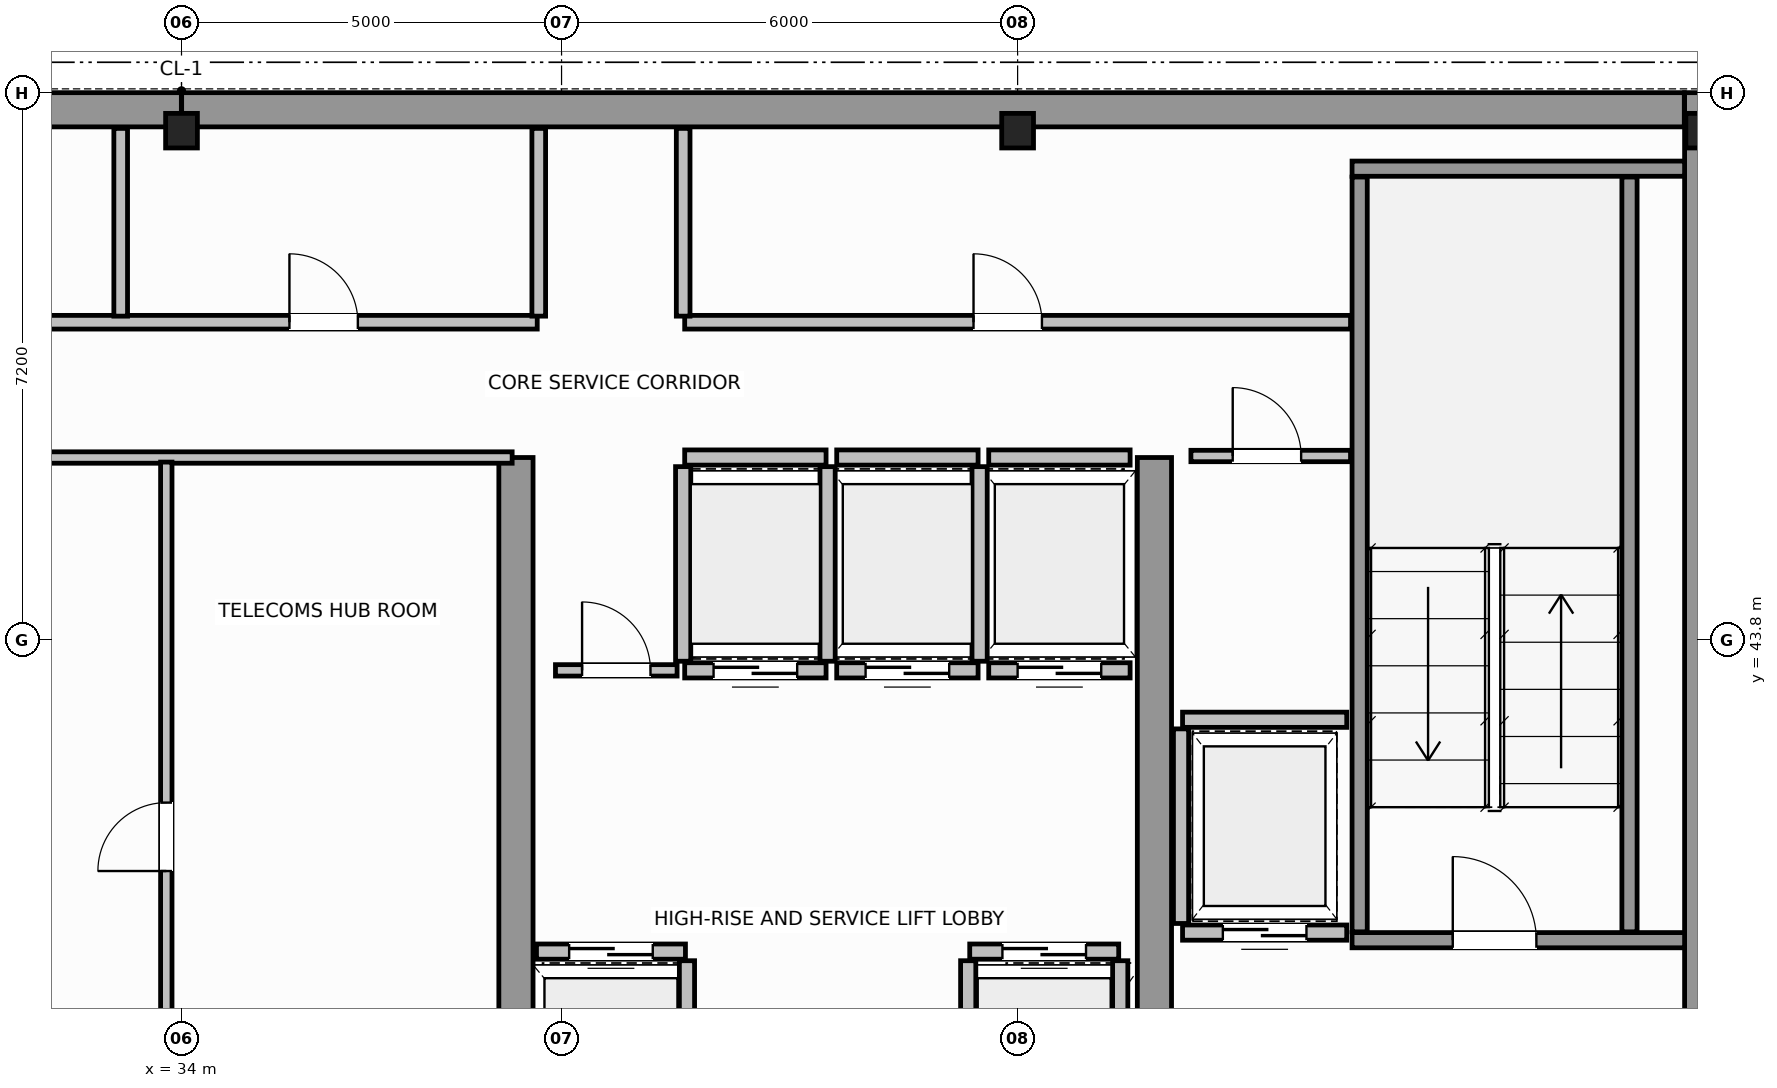
"""IFC4 building model, lengths in metres.
Left out: names, types, materials, properties, quantities, classifications, styles, units other than length and angle.
Written with IfcOpenShell. Run it as: python <this file> out.ifc"""

import sys

from ifc_helpers import new_model, si_unit, direction, frame, frame_2d, origin, origin_2d, place, context, subcontext, project, spatial, rectangle, i_section, extrude, source, transform, mapped, element, fill, save


model = new_model("IFC4")
c1 = context("Model", 3, precision=1e-05, world=origin(), true_north=direction((0.0, 1.0)))
c2 = subcontext(c1, "Body", "Model", "MODEL_VIEW")
j1 = project(units=[si_unit("LENGTHUNIT", "METRE"), si_unit("PLANEANGLEUNIT", "RADIAN")], contexts=[c1])
p1 = place(None, origin())
s1 = spatial("IfcSite", under=j1, at=p1, CompositionType="ELEMENT")
p2 = place(p1, origin())
s2 = spatial("IfcBuilding", under=s1, at=p2, CompositionType="ELEMENT")
p3 = place(p2, frame((0.0, 0.0, 257.4)))
s3 = spatial("IfcBuildingStorey", under=s2, at=p3, CompositionType="ELEMENT", Elevation=257.4)
m1 = source(origin(), c2, "Body", "SweptSolid", [
    extrude(i_section(OverallWidth=0.418, OverallDepth=0.455, WebThickness=0.042, FlangeThickness=0.058, FilletRadius=0.015, at=origin_2d()), origin(), (0.0, 0.0, 1.0), 3.8),
])
for number, where, z_axis, x_axis in (
    (1, (34.0, 50.5, 0.0), (0.0, 0.0, 1.0), (1.0, 0.0, 0.0)),
    (2, (45.0, 50.5, 0.0), (0.0, 0.0, 1.0), (1.0, 0.0, 0.0)),
    (3, (54.0, 50.5, 0.0), (0.0, 0.0, 1.0), (1.0, 0.0, 0.0)),
):
    element("IfcColumn", number, at=place(p3, frame(where, z_axis=z_axis, x_axis=x_axis)), inside=s3, PredefinedType="COLUMN", context=c2, shape_type="MappedRepresentation", body=[
        mapped(m1, transform((0.0, 0.0, 0.0), scale=1.0)),
    ])
for number, where, z_axis, x_axis in (
    (4, (14.229, 50.775, 0.0), (0.0, 0.0, 1.0), (1.0, 0.0, 0.0)),
    (5, (34.002, 50.775, 0.0), (0.0, 0.0, 1.0), (1.0, 0.0, 0.0)),
):
    element("IfcWall", number, at=place(p3, frame(where, z_axis=z_axis, x_axis=x_axis)), inside=s3, PredefinedType="SHEAR", context=c2, shape_type="SweptSolid", body=[
        extrude(rectangle(XDim=19.769, YDim=0.45, at=frame_2d((9.885, 0.0))), origin(), (0.0, 0.0, 1.0), 3.8),
    ])
p4 = place(p3, frame((54.0, 36.5, 0.0), z_axis=(0.0, 0.0, 1.0), x_axis=(0.0, 1.0, 0.0)))
e6 = element("IfcWall", 6, at=p4, inside=s3, PredefinedType="SHEAR", context=c2, shape_type="SweptSolid", body=[
    extrude(rectangle(XDim=14.5, YDim=0.45, at=frame_2d((7.25, 0.0))), origin(), (0.0, 0.0, 1.0), 3.8),
])
for number, where, z_axis, x_axis in (
    (7, (38.4, 36.745, 0.0), (0.0, 0.0, 1.0), (0.0, 1.0, 0.0)),
    (8, (46.8, 36.745, 0.0), (0.0, 0.0, 1.0), (0.0, 1.0, 0.0)),
):
    element("IfcWall", number, at=place(p3, frame(where, z_axis=z_axis, x_axis=x_axis)), inside=s3, PredefinedType="SHEAR", context=c2, shape_type="SweptSolid", body=[
        extrude(rectangle(XDim=9.455, YDim=0.45, at=frame_2d((4.728, 0.0))), origin(), (0.0, 0.0, 1.0), 3.8),
    ])
p5 = place(p3, frame((49.4, 39.85, 0.0), z_axis=(0.0, 0.0, 1.0), x_axis=(1.0, 0.0, 0.0)))
e9 = element("IfcWall", 9, at=p5, inside=s3, PredefinedType="SOLIDWALL", context=c2, shape_type="SweptSolid", body=[
    extrude(rectangle(XDim=4.375, YDim=0.2, at=frame_2d((2.188, 0.0))), origin(), (0.0, 0.0, 1.0), 3.8),
])
p6 = place(p5, frame((1.325, 0.0, 0.0)))
e10 = element("IfcOpeningElement", 10, at=p6, cuts=e9, PredefinedType="OPENING", context=c2, shape_type="SweptSolid", body=[
    extrude(rectangle(XDim=1.1, YDim=2.15, at=frame_2d((0.55, 1.075))), frame((0.0, 0.11, 0.0), z_axis=(0.0, -1.0, 0.0), x_axis=(1.0, 0.0, 0.0)), (0.0, 0.0, 1.0), 0.22),
])
p7 = place(p3, frame((49.4, 50.0, 0.0), z_axis=(0.0, 0.0, 1.0), x_axis=(1.0, 0.0, 0.0)))
e11 = element("IfcWall", 11, at=p7, inside=s3, PredefinedType="SOLIDWALL", context=c2, shape_type="SweptSolid", body=[
    extrude(rectangle(XDim=4.375, YDim=0.2, at=frame_2d((2.188, 0.0))), origin(), (0.0, 0.0, 1.0), 3.8),
])
for number, where, z_axis, x_axis in (
    (12, (49.5, 39.96, 0.0), (0.0, 0.0, 1.0), (0.0, 1.0, 0.0)),
    (13, (53.05, 39.96, 0.0), (0.0, 0.0, 1.0), (0.0, 1.0, 0.0)),
):
    element("IfcWall", number, at=place(p3, frame(where, z_axis=z_axis, x_axis=x_axis)), inside=s3, PredefinedType="SOLIDWALL", context=c2, shape_type="SweptSolid", body=[
        extrude(rectangle(XDim=9.93, YDim=0.2, at=frame_2d((4.965, 0.0))), origin(), (0.0, 0.0, 1.0), 3.8),
    ])
p8 = place(p3, frame((38.67, 39.7, 0.0), z_axis=(0.0, 0.0, 1.0), x_axis=(1.0, 0.0, 0.0)))
e14 = element("IfcWall", 14, at=p8, inside=s3, PredefinedType="SOLIDWALL", context=c2, shape_type="SweptSolid", body=[
    extrude(rectangle(XDim=1.96, YDim=0.2, at=frame_2d((0.98, 0.0))), origin(), (0.0, 0.0, 1.0), 3.58),
])
p9 = place(p8, frame((0.43, 0.0, 0.0)))
e15 = element("IfcOpeningElement", 15, at=p9, cuts=e14, PredefinedType="OPENING", context=c2, shape_type="SweptSolid", body=[
    extrude(rectangle(XDim=1.1, YDim=2.15, at=frame_2d((0.55, 1.075))), frame((0.0, 0.11, 0.0), z_axis=(0.0, -1.0, 0.0), x_axis=(1.0, 0.0, 0.0)), (0.0, 0.0, 1.0), 0.22),
])
p10 = place(p3, frame((40.65, 37.02, 0.0), z_axis=(0.0, 0.0, 1.0), x_axis=(0.0, 1.0, 0.0)))
e16 = element("IfcWall", 16, at=p10, inside=s3, PredefinedType="SOLIDWALL", context=c2, shape_type="SweptSolid", body=[
    extrude(rectangle(XDim=2.56, YDim=0.2, at=frame_2d((1.28, 0.0))), origin(), (0.0, 0.0, 1.0), 3.58),
])
p11 = place(p3, frame((44.37, 39.7, 0.0), z_axis=(0.0, 0.0, 1.0), x_axis=(1.0, 0.0, 0.0)))
e17 = element("IfcWall", 17, at=p11, inside=s3, PredefinedType="SOLIDWALL", context=c2, shape_type="SweptSolid", body=[
    extrude(rectangle(XDim=1.96, YDim=0.2, at=frame_2d((0.98, 0.0))), origin(), (0.0, 0.0, 1.0), 3.58),
])
p12 = place(p11, frame((0.43, 0.0, 0.0)))
e18 = element("IfcOpeningElement", 18, at=p12, cuts=e17, PredefinedType="OPENING", context=c2, shape_type="SweptSolid", body=[
    extrude(rectangle(XDim=1.1, YDim=2.15, at=frame_2d((0.55, 1.075))), frame((0.0, 0.11, 0.0), z_axis=(0.0, -1.0, 0.0), x_axis=(1.0, 0.0, 0.0)), (0.0, 0.0, 1.0), 0.22),
])
for number, where, z_axis, x_axis in (
    (19, (44.35, 37.02, 0.0), (0.0, 0.0, 1.0), (0.0, 1.0, 0.0)),
    (20, (46.35, 37.02, 0.0), (0.0, 0.0, 1.0), (0.0, 1.0, 0.0)),
):
    element("IfcWall", number, at=place(p3, frame(where, z_axis=z_axis, x_axis=x_axis)), inside=s3, PredefinedType="SOLIDWALL", context=c2, shape_type="SweptSolid", body=[
        extrude(rectangle(XDim=2.56, YDim=0.2, at=frame_2d((1.28, 0.0))), origin(), (0.0, 0.0, 1.0), 3.58),
    ])
p13 = place(p3, frame((40.62, 43.4, 0.0), z_axis=(0.0, 0.0, 1.0), x_axis=(1.0, 0.0, 0.0)))
e21 = element("IfcWall", 21, at=p13, inside=s3, PredefinedType="SOLIDWALL", context=c2, shape_type="SweptSolid", body=[
    extrude(rectangle(XDim=1.86, YDim=0.2, at=frame_2d((0.93, 0.0))), origin(), (0.0, 0.0, 1.0), 3.58),
])
p14 = place(p13, frame((0.38, 0.0, 0.0)))
e22 = element("IfcOpeningElement", 22, at=p14, cuts=e21, PredefinedType="OPENING", context=c2, shape_type="SweptSolid", body=[
    extrude(rectangle(XDim=1.1, YDim=2.15, at=frame_2d((0.55, 1.075))), frame((0.0, 0.11, 0.0), z_axis=(0.0, -1.0, 0.0), x_axis=(1.0, 0.0, 0.0)), (0.0, 0.0, 1.0), 0.22),
])
p15 = place(p3, frame((40.62, 46.2, 0.0), z_axis=(0.0, 0.0, 1.0), x_axis=(1.0, 0.0, 0.0)))
e23 = element("IfcWall", 23, at=p15, inside=s3, PredefinedType="SOLIDWALL", context=c2, shape_type="SweptSolid", body=[
    extrude(rectangle(XDim=1.86, YDim=0.2, at=frame_2d((0.93, 0.0))), origin(), (0.0, 0.0, 1.0), 3.58),
])
for number, where, z_axis, x_axis in (
    (24, (40.6, 43.52, 0.0), (0.0, 0.0, 1.0), (0.0, 1.0, 0.0)),
    (25, (42.5, 43.52, 0.0), (0.0, 0.0, 1.0), (0.0, 1.0, 0.0)),
):
    element("IfcWall", number, at=place(p3, frame(where, z_axis=z_axis, x_axis=x_axis)), inside=s3, PredefinedType="SOLIDWALL", context=c2, shape_type="SweptSolid", body=[
        extrude(rectangle(XDim=2.56, YDim=0.2, at=frame_2d((1.28, 0.0))), origin(), (0.0, 0.0, 1.0), 3.58),
    ])
p16 = place(p3, frame((42.62, 43.4, 0.0), z_axis=(0.0, 0.0, 1.0), x_axis=(1.0, 0.0, 0.0)))
e26 = element("IfcWall", 26, at=p16, inside=s3, PredefinedType="SOLIDWALL", context=c2, shape_type="SweptSolid", body=[
    extrude(rectangle(XDim=1.86, YDim=0.2, at=frame_2d((0.93, 0.0))), origin(), (0.0, 0.0, 1.0), 3.58),
])
p17 = place(p16, frame((0.38, 0.0, 0.0)))
e27 = element("IfcOpeningElement", 27, at=p17, cuts=e26, PredefinedType="OPENING", context=c2, shape_type="SweptSolid", body=[
    extrude(rectangle(XDim=1.1, YDim=2.15, at=frame_2d((0.55, 1.075))), frame((0.0, 0.11, 0.0), z_axis=(0.0, -1.0, 0.0), x_axis=(1.0, 0.0, 0.0)), (0.0, 0.0, 1.0), 0.22),
])
p18 = place(p3, frame((42.62, 46.2, 0.0), z_axis=(0.0, 0.0, 1.0), x_axis=(1.0, 0.0, 0.0)))
e28 = element("IfcWall", 28, at=p18, inside=s3, PredefinedType="SOLIDWALL", context=c2, shape_type="SweptSolid", body=[
    extrude(rectangle(XDim=1.86, YDim=0.2, at=frame_2d((0.93, 0.0))), origin(), (0.0, 0.0, 1.0), 3.58),
])
p19 = place(p3, frame((44.5, 43.52, 0.0), z_axis=(0.0, 0.0, 1.0), x_axis=(0.0, 1.0, 0.0)))
e29 = element("IfcWall", 29, at=p19, inside=s3, PredefinedType="SOLIDWALL", context=c2, shape_type="SweptSolid", body=[
    extrude(rectangle(XDim=2.56, YDim=0.2, at=frame_2d((1.28, 0.0))), origin(), (0.0, 0.0, 1.0), 3.58),
])
p20 = place(p3, frame((44.62, 43.4, 0.0), z_axis=(0.0, 0.0, 1.0), x_axis=(1.0, 0.0, 0.0)))
e30 = element("IfcWall", 30, at=p20, inside=s3, PredefinedType="SOLIDWALL", context=c2, shape_type="SweptSolid", body=[
    extrude(rectangle(XDim=1.86, YDim=0.2, at=frame_2d((0.93, 0.0))), origin(), (0.0, 0.0, 1.0), 3.58),
])
p21 = place(p20, frame((0.38, 0.0, 0.0)))
e31 = element("IfcOpeningElement", 31, at=p21, cuts=e30, PredefinedType="OPENING", context=c2, shape_type="SweptSolid", body=[
    extrude(rectangle(XDim=1.1, YDim=2.15, at=frame_2d((0.55, 1.075))), frame((0.0, 0.11, 0.0), z_axis=(0.0, -1.0, 0.0), x_axis=(1.0, 0.0, 0.0)), (0.0, 0.0, 1.0), 0.22),
])
p22 = place(p3, frame((44.62, 46.2, 0.0), z_axis=(0.0, 0.0, 1.0), x_axis=(1.0, 0.0, 0.0)))
e32 = element("IfcWall", 32, at=p22, inside=s3, PredefinedType="SOLIDWALL", context=c2, shape_type="SweptSolid", body=[
    extrude(rectangle(XDim=1.86, YDim=0.2, at=frame_2d((0.93, 0.0))), origin(), (0.0, 0.0, 1.0), 3.58),
])
p23 = place(p3, frame((47.17, 39.95, 0.0), z_axis=(0.0, 0.0, 1.0), x_axis=(1.0, 0.0, 0.0)))
e33 = element("IfcWall", 33, at=p23, inside=s3, PredefinedType="SOLIDWALL", context=c2, shape_type="SweptSolid", body=[
    extrude(rectangle(XDim=2.16, YDim=0.2, at=frame_2d((1.08, 0.0))), origin(), (0.0, 0.0, 1.0), 3.58),
])
p24 = place(p23, frame((0.53, 0.0, 0.0)))
e34 = element("IfcOpeningElement", 34, at=p24, cuts=e33, PredefinedType="OPENING", context=c2, shape_type="SweptSolid", body=[
    extrude(rectangle(XDim=1.1, YDim=2.15, at=frame_2d((0.55, 1.075))), frame((0.0, 0.11, 0.0), z_axis=(0.0, -1.0, 0.0), x_axis=(1.0, 0.0, 0.0)), (0.0, 0.0, 1.0), 0.22),
])
p25 = place(p3, frame((47.17, 42.75, 0.0), z_axis=(0.0, 0.0, 1.0), x_axis=(1.0, 0.0, 0.0)))
e35 = element("IfcWall", 35, at=p25, inside=s3, PredefinedType="SOLIDWALL", context=c2, shape_type="SweptSolid", body=[
    extrude(rectangle(XDim=2.16, YDim=0.2, at=frame_2d((1.08, 0.0))), origin(), (0.0, 0.0, 1.0), 3.58),
])
p26 = place(p3, frame((47.15, 40.07, 0.0), z_axis=(0.0, 0.0, 1.0), x_axis=(0.0, 1.0, 0.0)))
e36 = element("IfcWall", 36, at=p26, inside=s3, PredefinedType="SOLIDWALL", context=c2, shape_type="SweptSolid", body=[
    extrude(rectangle(XDim=2.56, YDim=0.2, at=frame_2d((1.28, 0.0))), origin(), (0.0, 0.0, 1.0), 3.58),
])
p27 = place(p3, frame((29.85, 46.2, 0.0), z_axis=(0.0, 0.0, 1.0), x_axis=(1.0, 0.0, 0.0)))
e37 = element("IfcWall", 37, at=p27, inside=s3, PredefinedType="PARTITIONING", context=c2, shape_type="SweptSolid", body=[
    extrude(rectangle(XDim=8.5, YDim=0.15, at=frame_2d((4.25, 0.0))), origin(), (0.0, 0.0, 1.0), 3.58),
])
p28 = place(p3, frame((33.8, 36.56, 0.0), z_axis=(0.0, 0.0, 1.0), x_axis=(0.0, 1.0, 0.0)))
e38 = element("IfcWall", 38, at=p28, inside=s3, PredefinedType="PARTITIONING", context=c2, shape_type="SweptSolid", body=[
    extrude(rectangle(XDim=9.58, YDim=0.15, at=frame_2d((4.79, 0.0))), origin(), (0.0, 0.0, 1.0), 3.58),
])
p29 = place(p28, frame((4.2, 0.0, 0.0)))
e39 = element("IfcOpeningElement", 39, at=p29, cuts=e38, PredefinedType="OPENING", context=c2, shape_type="SweptSolid", body=[
    extrude(rectangle(XDim=0.9, YDim=2.1, at=frame_2d((0.45, 1.05))), frame((0.0, 0.085, 0.0), z_axis=(0.0, -1.0, 0.0), x_axis=(1.0, 0.0, 0.0)), (0.0, 0.0, 1.0), 0.17),
])
p30 = place(p3, frame((47.28, 46.22, 0.0), z_axis=(0.0, 0.0, 1.0), x_axis=(1.0, 0.0, 0.0)))
e40 = element("IfcWall", 40, at=p30, inside=s3, PredefinedType="PARTITIONING", context=c2, shape_type="SweptSolid", body=[
    extrude(rectangle(XDim=2.1, YDim=0.15, at=frame_2d((1.05, 0.0))), origin(), (0.0, 0.0, 1.0), 3.58),
])
p31 = place(p30, frame((0.55, 0.0, 0.0)))
e41 = element("IfcOpeningElement", 41, at=p31, cuts=e40, PredefinedType="OPENING", context=c2, shape_type="SweptSolid", body=[
    extrude(rectangle(XDim=0.9, YDim=2.1, at=frame_2d((0.45, 1.05))), frame((0.0, 0.085, 0.0), z_axis=(0.0, -1.0, 0.0), x_axis=(1.0, 0.0, 0.0)), (0.0, 0.0, 1.0), 0.17),
])
p32 = place(p3, frame((38.92, 43.4, 0.0), z_axis=(0.0, 0.0, 1.0), x_axis=(1.0, 0.0, 0.0)))
e42 = element("IfcWall", 42, at=p32, inside=s3, PredefinedType="PARTITIONING", context=c2, shape_type="SweptSolid", body=[
    extrude(rectangle(XDim=1.6, YDim=0.15, at=frame_2d((0.8, 0.0))), origin(), (0.0, 0.0, 1.0), 3.58),
])
p33 = place(p32, frame((0.35, 0.0, 0.0)))
e43 = element("IfcOpeningElement", 43, at=p33, cuts=e42, PredefinedType="OPENING", context=c2, shape_type="SweptSolid", body=[
    extrude(rectangle(XDim=0.9, YDim=2.1, at=frame_2d((0.45, 1.05))), frame((0.0, 0.085, 0.0), z_axis=(0.0, -1.0, 0.0), x_axis=(1.0, 0.0, 0.0)), (0.0, 0.0, 1.0), 0.17),
])
p34 = place(p3, frame((18.62, 47.98, 0.0), z_axis=(0.0, 0.0, 1.0), x_axis=(1.0, 0.0, 0.0)))
e44 = element("IfcWall", 44, at=p34, inside=s3, PredefinedType="PLUMBINGWALL", context=c2, shape_type="SweptSolid", body=[
    extrude(rectangle(XDim=20.06, YDim=0.18, at=frame_2d((10.03, 0.0))), origin(), (0.0, 0.0, 1.0), 3.58),
])
p35 = place(p34, frame((3.5, 0.0, 0.0)))
e45 = element("IfcOpeningElement", 45, at=p35, cuts=e44, PredefinedType="OPENING", context=c2, shape_type="SweptSolid", body=[
    extrude(rectangle(XDim=0.9, YDim=2.15, at=frame_2d((0.45, 1.075))), frame((0.0, 0.1, 0.0), z_axis=(0.0, -1.0, 0.0), x_axis=(1.0, 0.0, 0.0)), (0.0, 0.0, 1.0), 0.2),
])
p36 = place(p34, frame((10.8, 0.0, 0.0)))
e46 = element("IfcOpeningElement", 46, at=p36, cuts=e44, PredefinedType="OPENING", context=c2, shape_type="SweptSolid", body=[
    extrude(rectangle(XDim=0.9, YDim=2.15, at=frame_2d((0.45, 1.075))), frame((0.0, 0.1, 0.0), z_axis=(0.0, -1.0, 0.0), x_axis=(1.0, 0.0, 0.0)), (0.0, 0.0, 1.0), 0.2),
])
p37 = place(p34, frame((16.8, 0.0, 0.0)))
e47 = element("IfcOpeningElement", 47, at=p37, cuts=e44, PredefinedType="OPENING", context=c2, shape_type="SweptSolid", body=[
    extrude(rectangle(XDim=0.9, YDim=2.15, at=frame_2d((0.45, 1.075))), frame((0.0, 0.1, 0.0), z_axis=(0.0, -1.0, 0.0), x_axis=(1.0, 0.0, 0.0)), (0.0, 0.0, 1.0), 0.2),
])
p38 = place(p3, frame((40.62, 47.98, 0.0), z_axis=(0.0, 0.0, 1.0), x_axis=(1.0, 0.0, 0.0)))
e48 = element("IfcWall", 48, at=p38, inside=s3, PredefinedType="PLUMBINGWALL", context=c2, shape_type="SweptSolid", body=[
    extrude(rectangle(XDim=8.76, YDim=0.18, at=frame_2d((4.38, 0.0))), origin(), (0.0, 0.0, 1.0), 3.58),
])
p39 = place(p38, frame((3.8, 0.0, 0.0)))
e49 = element("IfcOpeningElement", 49, at=p39, cuts=e48, PredefinedType="OPENING", context=c2, shape_type="SweptSolid", body=[
    extrude(rectangle(XDim=0.9, YDim=2.15, at=frame_2d((0.45, 1.075))), frame((0.0, 0.1, 0.0), z_axis=(0.0, -1.0, 0.0), x_axis=(1.0, 0.0, 0.0)), (0.0, 0.0, 1.0), 0.2),
])
for number, where, z_axis, x_axis in (
    (50, (33.2, 48.06, 0.0), (0.0, 0.0, 1.0), (0.0, 1.0, 0.0)),
    (51, (38.7, 48.06, 0.0), (0.0, 0.0, 1.0), (0.0, 1.0, 0.0)),
    (52, (40.6, 48.06, 0.0), (0.0, 0.0, 1.0), (0.0, 1.0, 0.0)),
):
    element("IfcWall", number, at=place(p3, frame(where, z_axis=z_axis, x_axis=x_axis)), inside=s3, PredefinedType="PLUMBINGWALL", context=c2, shape_type="SweptSolid", body=[
        extrude(rectangle(XDim=2.47, YDim=0.18, at=frame_2d((1.235, 0.0))), origin(), (0.0, 0.0, 1.0), 3.58),
    ])
m2 = source(origin(), c2, "Body", "SweptSolid", [
    extrude(rectangle(XDim=1.1, YDim=2.15, at=frame_2d((0.55, 1.075))), frame((0.0, 0.025, 0.0), z_axis=(0.0, -1.0, 0.0), x_axis=(1.0, 0.0, 0.0)), (0.0, 0.0, 1.0), 0.05),
])
p40 = place(p6, origin())
e53 = element("IfcDoor", 53, at=p40, inside=s3, OperationType="SINGLE_SWING_RIGHT", PredefinedType="DOOR", context=c2, shape_type="MappedRepresentation", body=[
    mapped(m2, transform((0.0, 0.0, 0.0), scale=1.0)),
])
fill(e10, e53)
p41 = place(p9, origin())
e54 = element("IfcDoor", 54, at=p41, inside=s3, OperationType="DOUBLE_DOOR_SLIDING", PredefinedType="DOOR", context=c2, shape_type="MappedRepresentation", body=[
    mapped(m2, transform((0.0, 0.0, 0.0), scale=1.0)),
])
fill(e15, e54)
p42 = place(p12, origin())
e55 = element("IfcDoor", 55, at=p42, inside=s3, OperationType="DOUBLE_DOOR_SLIDING", PredefinedType="DOOR", context=c2, shape_type="MappedRepresentation", body=[
    mapped(m2, transform((0.0, 0.0, 0.0), scale=1.0)),
])
fill(e18, e55)
p43 = place(p14, origin())
e56 = element("IfcDoor", 56, at=p43, inside=s3, OperationType="DOUBLE_DOOR_SLIDING", PredefinedType="DOOR", context=c2, shape_type="MappedRepresentation", body=[
    mapped(m2, transform((0.0, 0.0, 0.0), scale=1.0)),
])
fill(e22, e56)
p44 = place(p17, origin())
e57 = element("IfcDoor", 57, at=p44, inside=s3, OperationType="DOUBLE_DOOR_SLIDING", PredefinedType="DOOR", context=c2, shape_type="MappedRepresentation", body=[
    mapped(m2, transform((0.0, 0.0, 0.0), scale=1.0)),
])
fill(e27, e57)
p45 = place(p21, origin())
e58 = element("IfcDoor", 58, at=p45, inside=s3, OperationType="DOUBLE_DOOR_SLIDING", PredefinedType="DOOR", context=c2, shape_type="MappedRepresentation", body=[
    mapped(m2, transform((0.0, 0.0, 0.0), scale=1.0)),
])
fill(e31, e58)
p46 = place(p24, origin())
e59 = element("IfcDoor", 59, at=p46, inside=s3, OperationType="DOUBLE_DOOR_SLIDING", PredefinedType="DOOR", context=c2, shape_type="MappedRepresentation", body=[
    mapped(m2, transform((0.0, 0.0, 0.0), scale=1.0)),
])
fill(e34, e59)
m3 = source(origin(), c2, "Body", "SweptSolid", [
    extrude(rectangle(XDim=0.9, YDim=2.1, at=frame_2d((0.45, 1.05))), frame((0.0, 0.025, 0.0), z_axis=(0.0, -1.0, 0.0), x_axis=(1.0, 0.0, 0.0)), (0.0, 0.0, 1.0), 0.05),
])
p47 = place(p29, origin())
e60 = element("IfcDoor", 60, at=p47, inside=s3, OperationType="SINGLE_SWING_RIGHT", PredefinedType="DOOR", context=c2, shape_type="MappedRepresentation", body=[
    mapped(m3, transform((0.0, 0.0, 0.0), scale=1.0)),
])
fill(e39, e60)
p48 = place(p31, origin())
e61 = element("IfcDoor", 61, at=p48, inside=s3, OperationType="SINGLE_SWING_RIGHT", PredefinedType="DOOR", context=c2, shape_type="MappedRepresentation", body=[
    mapped(m3, transform((0.0, 0.0, 0.0), scale=1.0)),
])
fill(e41, e61)
p49 = place(p33, origin())
e62 = element("IfcDoor", 62, at=p49, inside=s3, OperationType="SINGLE_SWING_LEFT", PredefinedType="DOOR", context=c2, shape_type="MappedRepresentation", body=[
    mapped(m3, transform((0.0, 0.0, 0.0), scale=1.0)),
])
fill(e43, e62)
m4 = source(origin(), c2, "Body", "SweptSolid", [
    extrude(rectangle(XDim=0.9, YDim=2.15, at=frame_2d((0.45, 1.075))), frame((0.0, 0.025, 0.0), z_axis=(0.0, -1.0, 0.0), x_axis=(1.0, 0.0, 0.0)), (0.0, 0.0, 1.0), 0.05),
])
p50 = place(p37, origin())
e63 = element("IfcDoor", 63, at=p50, inside=s3, OperationType="SINGLE_SWING_LEFT", PredefinedType="DOOR", context=c2, shape_type="MappedRepresentation", body=[
    mapped(m4, transform((0.0, 0.0, 0.0), scale=1.0)),
])
fill(e47, e63)
p51 = place(p39, origin())
e64 = element("IfcDoor", 64, at=p51, inside=s3, OperationType="SINGLE_SWING_RIGHT", PredefinedType="DOOR", context=c2, shape_type="MappedRepresentation", body=[
    mapped(m4, transform((0.0, 0.0, 0.0), scale=1.0)),
])
fill(e49, e64)
save(model, sys.argv[1])
